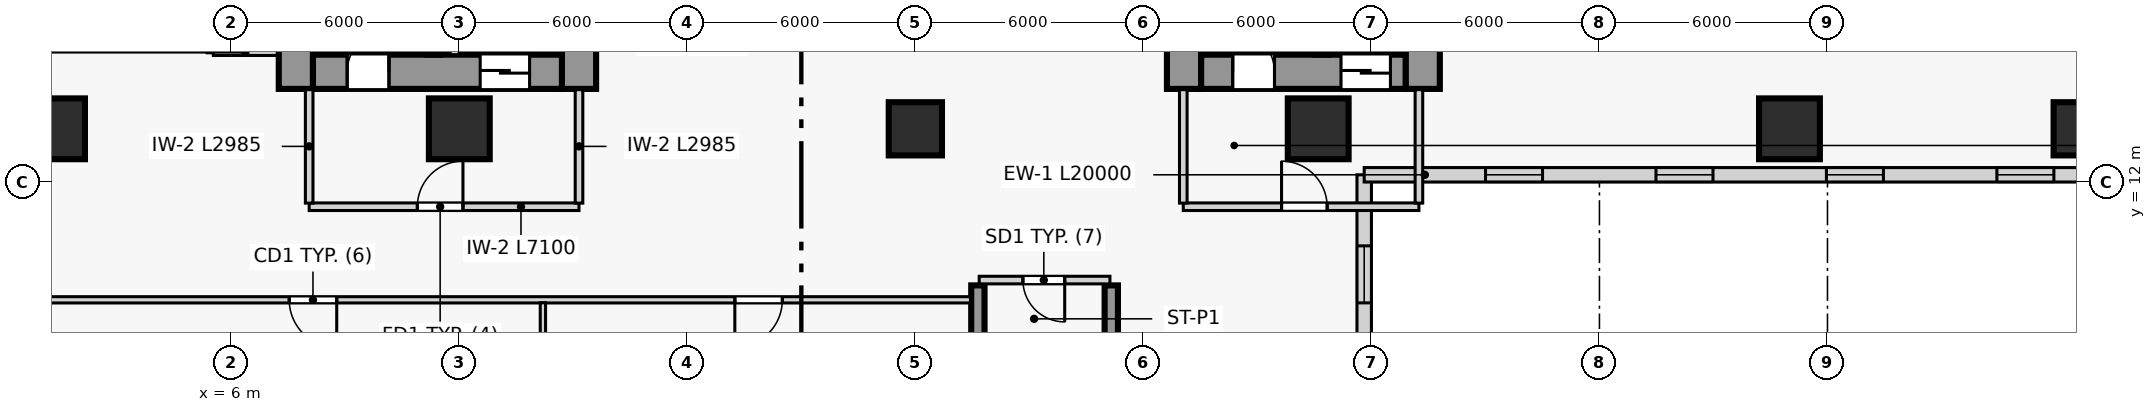
"""IFC4 building model, lengths in metres.
Left out: names, types, materials, properties, quantities, classifications, styles, units other than length and angle.
Written with IfcOpenShell. Run it as: python <this file> out.ifc"""

import sys

from ifc_helpers import new_model, si_unit, direction, frame, frame_2d, origin, origin_2d, place, context, subcontext, project, spatial, rectangle, extrude, source, transform, mapped, element, fill, save


model = new_model("IFC4")
c1 = context("Model", 3, precision=1e-05, world=origin(), true_north=direction((0.0, 1.0)))
c2 = subcontext(c1, "Body", "Model", "MODEL_VIEW")
j1 = project(units=[si_unit("LENGTHUNIT", "METRE"), si_unit("PLANEANGLEUNIT", "RADIAN")], contexts=[c1])
p1 = place(None, origin())
s1 = spatial("IfcSite", under=j1, at=p1, CompositionType="ELEMENT")
p2 = place(p1, origin())
s2 = spatial("IfcBuilding", under=s1, at=p2, CompositionType="ELEMENT")
p3 = place(p2, frame((0.0, 0.0, 9.0)))
s3 = spatial("IfcBuildingStorey", under=s2, at=p3, CompositionType="ELEMENT", Elevation=9.0)
p4 = place(p3, frame((7.7, 14.45, 0.0), z_axis=(0.0, 0.0, 1.0), x_axis=(0.0, 1.0, 0.0)))
e1 = element("IfcWall", 1, at=p4, inside=s3, PredefinedType="SHEAR", context=c2, shape_type="SweptSolid", body=[
    extrude(rectangle(XDim=13.15, YDim=0.9, at=frame_2d((6.575, 0.0))), origin(), (0.0, 0.0, 1.0), 4.5),
])
p5 = place(p3, frame((15.15, 14.45, 0.0), z_axis=(0.0, 0.0, 1.0), x_axis=(0.0, 1.0, 0.0)))
e2 = element("IfcWall", 2, at=p5, inside=s3, PredefinedType="SHEAR", context=c2, shape_type="SweptSolid", body=[
    extrude(rectangle(XDim=13.15, YDim=0.9, at=frame_2d((6.575, 0.0))), origin(), (0.0, 0.0, 1.0), 4.5),
])
p6 = place(p5, frame((5.65, 0.0, 0.0)))
e3 = element("IfcOpeningElement", 3, at=p6, cuts=e2, PredefinedType="OPENING", context=c2, shape_type="SweptSolid", body=[
    extrude(rectangle(XDim=1.1, YDim=2.2, at=frame_2d((0.55, 1.1))), frame((0.0, 0.46, 0.0), z_axis=(0.0, -1.0, 0.0), x_axis=(1.0, 0.0, 0.0)), (0.0, 0.0, 1.0), 0.92),
])
p7 = place(p3, frame((8.15, 14.9, 0.0), z_axis=(0.0, 0.0, 1.0), x_axis=(1.0, 0.0, 0.0)))
e4 = element("IfcWall", 4, at=p7, inside=s3, PredefinedType="SHEAR", context=c2, shape_type="SweptSolid", body=[
    extrude(rectangle(XDim=6.55, YDim=0.9, at=frame_2d((3.275, 0.0))), origin(), (0.0, 0.0, 1.0), 4.5),
])
p8 = place(p7, frame((0.9, 0.0, 0.0)))
e5 = element("IfcOpeningElement", 5, at=p8, cuts=e4, PredefinedType="OPENING", context=c2, shape_type="SweptSolid", body=[
    extrude(rectangle(XDim=1.1, YDim=2.2, at=frame_2d((0.55, 1.1))), frame((0.0, 0.46, 0.0), z_axis=(0.0, -1.0, 0.0), x_axis=(1.0, 0.0, 0.0)), (0.0, 0.0, 1.0), 0.92),
])
p9 = place(p7, frame((4.4, 0.0, 0.0)))
e6 = element("IfcOpeningElement", 6, at=p9, cuts=e4, PredefinedType="OPENING", context=c2, shape_type="SweptSolid", body=[
    extrude(rectangle(XDim=1.3, YDim=2.2, at=frame_2d((0.65, 1.1))), frame((0.0, 0.46, 0.0), z_axis=(0.0, -1.0, 0.0), x_axis=(1.0, 0.0, 0.0)), (0.0, 0.0, 1.0), 0.92),
])
p10 = place(p3, frame((31.07, 14.45, 0.0), z_axis=(0.0, 0.0, 1.0), x_axis=(0.0, 1.0, 0.0)))
e7 = element("IfcWall", 7, at=p10, inside=s3, PredefinedType="SHEAR", context=c2, shape_type="SweptSolid", body=[
    extrude(rectangle(XDim=13.15, YDim=0.9, at=frame_2d((6.575, 0.0))), origin(), (0.0, 0.0, 1.0), 4.5),
])
p11 = place(p3, frame((37.35, 14.45, 0.0), z_axis=(0.0, 0.0, 1.0), x_axis=(0.0, 1.0, 0.0)))
e8 = element("IfcWall", 8, at=p11, inside=s3, PredefinedType="SHEAR", context=c2, shape_type="SweptSolid", body=[
    extrude(rectangle(XDim=13.15, YDim=0.9, at=frame_2d((6.575, 0.0))), origin(), (0.0, 0.0, 1.0), 4.5),
])
p12 = place(p11, frame((5.65, 0.0, 0.0)))
e9 = element("IfcOpeningElement", 9, at=p12, cuts=e8, PredefinedType="OPENING", context=c2, shape_type="SweptSolid", body=[
    extrude(rectangle(XDim=1.1, YDim=2.2, at=frame_2d((0.55, 1.1))), frame((0.0, 0.46, 0.0), z_axis=(0.0, -1.0, 0.0), x_axis=(1.0, 0.0, 0.0)), (0.0, 0.0, 1.0), 0.92),
])
p13 = place(p3, frame((31.52, 14.9, 0.0), z_axis=(0.0, 0.0, 1.0), x_axis=(1.0, 0.0, 0.0)))
e10 = element("IfcWall", 10, at=p13, inside=s3, PredefinedType="SHEAR", context=c2, shape_type="SweptSolid", body=[
    extrude(rectangle(XDim=5.38, YDim=0.9, at=frame_2d((2.69, 0.0))), origin(), (0.0, 0.0, 1.0), 4.5),
])
p14 = place(p13, frame((0.83, 0.0, 0.0)))
e11 = element("IfcOpeningElement", 11, at=p14, cuts=e10, PredefinedType="OPENING", context=c2, shape_type="SweptSolid", body=[
    extrude(rectangle(XDim=1.1, YDim=2.2, at=frame_2d((0.55, 1.1))), frame((0.0, 0.46, 0.0), z_axis=(0.0, -1.0, 0.0), x_axis=(1.0, 0.0, 0.0)), (0.0, 0.0, 1.0), 0.92),
])
p15 = place(p13, frame((3.68, 0.0, 0.0)))
e12 = element("IfcOpeningElement", 12, at=p15, cuts=e10, PredefinedType="OPENING", context=c2, shape_type="SweptSolid", body=[
    extrude(rectangle(XDim=1.3, YDim=2.2, at=frame_2d((0.65, 1.1))), frame((0.0, 0.46, 0.0), z_axis=(0.0, -1.0, 0.0), x_axis=(1.0, 0.0, 0.0)), (0.0, 0.0, 1.0), 0.92),
])
for number, where, z_axis, x_axis in (
    (13, (11.325, 15.35, 0.0), (0.0, 0.0, 1.0), (0.0, 1.0, 0.0)),
    (14, (34.695, 15.35, 0.0), (0.0, 0.0, 1.0), (0.0, 1.0, 0.0)),
):
    element("IfcWall", number, at=place(p3, frame(where, z_axis=z_axis, x_axis=x_axis)), inside=s3, PredefinedType="SHEAR", context=c2, shape_type="SweptSolid", body=[
        extrude(rectangle(XDim=7.75, YDim=0.35, at=frame_2d((3.875, 0.0))), origin(), (0.0, 0.0, 1.0), 4.5),
    ])
for number, where, z_axis, x_axis in (
    (15, (25.645, 1.57, 0.0), (0.0, 0.0, 1.0), (0.0, 1.0, 0.0)),
    (16, (29.155, 1.57, 0.0), (0.0, 0.0, 1.0), (0.0, 1.0, 0.0)),
):
    element("IfcWall", number, at=place(p3, frame(where, z_axis=z_axis, x_axis=x_axis)), inside=s3, PredefinedType="SHEAR", context=c2, shape_type="SweptSolid", body=[
        extrude(rectangle(XDim=7.71, YDim=0.35, at=frame_2d((3.855, 0.0))), origin(), (0.0, 0.0, 1.0), 4.5),
    ])
m1 = source(origin(), c2, "Body", "SweptSolid", [
    extrude(rectangle(XDim=1.6, YDim=1.6, at=origin_2d()), origin(), (0.0, 0.0, 1.0), 4.5),
])
for number, where, z_axis, x_axis in (
    (17, (1.35, 13.4, 0.0), (0.0, 0.0, 1.0), (1.0, 0.0, 0.0)),
    (18, (12.0, 13.4, 0.0), (0.0, 0.0, 1.0), (1.0, 0.0, 0.0)),
):
    element("IfcColumn", number, at=place(p3, frame(where, z_axis=z_axis, x_axis=x_axis)), inside=s3, PredefinedType="COLUMN", context=c2, shape_type="MappedRepresentation", body=[
        mapped(m1, transform((0.0, 0.0, 0.0), scale=1.0)),
    ])
m2 = source(origin(), c2, "Body", "SweptSolid", [
    extrude(rectangle(XDim=1.4, YDim=1.4, at=origin_2d()), origin(), (0.0, 0.0, 1.0), 4.5),
])
p16 = place(p3, frame((24.0, 13.4, 0.0), z_axis=(0.0, 0.0, 1.0), x_axis=(1.0, 0.0, 0.0)))
e19 = element("IfcColumn", 19, at=p16, inside=s3, PredefinedType="COLUMN", context=c2, shape_type="MappedRepresentation", body=[
    mapped(m2, transform((0.0, 0.0, 0.0), scale=1.0)),
])
for number, where, z_axis, x_axis in (
    (20, (34.6, 13.4, 0.0), (0.0, 0.0, 1.0), (1.0, 0.0, 0.0)),
    (21, (47.0, 13.4, 0.0), (0.0, 0.0, 1.0), (1.0, 0.0, 0.0)),
):
    element("IfcColumn", number, at=place(p3, frame(where, z_axis=z_axis, x_axis=x_axis)), inside=s3, PredefinedType="COLUMN", context=c2, shape_type="MappedRepresentation", body=[
        mapped(m1, transform((0.0, 0.0, 0.0), scale=1.0)),
    ])
p17 = place(p3, frame((54.65, 13.4, 0.0), z_axis=(0.0, 0.0, 1.0), x_axis=(1.0, 0.0, 0.0)))
e22 = element("IfcColumn", 22, at=p17, inside=s3, PredefinedType="COLUMN", context=c2, shape_type="MappedRepresentation", body=[
    mapped(m2, transform((0.0, 0.0, 0.0), scale=1.0)),
])
p18 = place(p3, frame((35.81, 7.69, 0.0), z_axis=(0.0, 0.0, 1.0), x_axis=(0.0, 1.0, 0.0)))
e23 = element("IfcWall", 23, at=p18, inside=s3, PredefinedType="SOLIDWALL", context=c2, shape_type="SweptSolid", body=[
    extrude(rectangle(XDim=4.5, YDim=0.38, at=frame_2d((2.25, 0.0))), origin(), (0.0, 0.0, 1.0), 4.16),
])
p19 = place(p18, frame((1.13, 0.0, 0.85)))
e24 = element("IfcOpeningElement", 24, at=p19, cuts=e23, PredefinedType="OPENING", context=c2, shape_type="SweptSolid", body=[
    extrude(rectangle(XDim=1.5, YDim=1.8, at=frame_2d((0.75, 0.9))), frame((0.0, 0.2, 0.0), z_axis=(0.0, -1.0, 0.0), x_axis=(1.0, 0.0, 0.0)), (0.0, 0.0, 1.0), 0.4),
])
p20 = place(p3, frame((35.81, 12.19, 0.0), z_axis=(0.0, 0.0, 1.0), x_axis=(1.0, 0.0, 0.0)))
e25 = element("IfcWall", 25, at=p20, inside=s3, PredefinedType="SOLIDWALL", context=c2, shape_type="SweptSolid", body=[
    extrude(rectangle(XDim=20.0, YDim=0.38, at=frame_2d((10.0, 0.0))), origin(), (0.0, 0.0, 1.0), 4.16),
])
p21 = place(p20, frame((3.192, 0.0, 0.85)))
e26 = element("IfcOpeningElement", 26, at=p21, cuts=e25, PredefinedType="OPENING", context=c2, shape_type="SweptSolid", body=[
    extrude(rectangle(XDim=1.5, YDim=1.8, at=frame_2d((0.75, 0.9))), frame((0.0, 0.2, 0.0), z_axis=(0.0, -1.0, 0.0), x_axis=(1.0, 0.0, 0.0)), (0.0, 0.0, 1.0), 0.4),
])
p22 = place(p20, frame((7.677, 0.0, 0.85)))
e27 = element("IfcOpeningElement", 27, at=p22, cuts=e25, PredefinedType="OPENING", context=c2, shape_type="SweptSolid", body=[
    extrude(rectangle(XDim=1.5, YDim=1.8, at=frame_2d((0.75, 0.9))), frame((0.0, 0.2, 0.0), z_axis=(0.0, -1.0, 0.0), x_axis=(1.0, 0.0, 0.0)), (0.0, 0.0, 1.0), 0.4),
])
p23 = place(p20, frame((12.163, 0.0, 0.85)))
e28 = element("IfcOpeningElement", 28, at=p23, cuts=e25, PredefinedType="OPENING", context=c2, shape_type="SweptSolid", body=[
    extrude(rectangle(XDim=1.5, YDim=1.8, at=frame_2d((0.75, 0.9))), frame((0.0, 0.2, 0.0), z_axis=(0.0, -1.0, 0.0), x_axis=(1.0, 0.0, 0.0)), (0.0, 0.0, 1.0), 0.4),
])
p24 = place(p20, frame((16.647, 0.0, 0.85)))
e29 = element("IfcOpeningElement", 29, at=p24, cuts=e25, PredefinedType="OPENING", context=c2, shape_type="SweptSolid", body=[
    extrude(rectangle(XDim=1.5, YDim=1.8, at=frame_2d((0.75, 0.9))), frame((0.0, 0.2, 0.0), z_axis=(0.0, -1.0, 0.0), x_axis=(1.0, 0.0, 0.0)), (0.0, 0.0, 1.0), 0.4),
])
p25 = place(p3, frame((11.88, 15.35, 0.0), z_axis=(0.0, 0.0, 1.0), x_axis=(0.0, 1.0, 0.0)))
e30 = element("IfcWall", 30, at=p25, inside=s3, PredefinedType="PARTITIONING", context=c2, shape_type="SweptSolid", body=[
    extrude(rectangle(XDim=2.85, YDim=0.24, at=frame_2d((1.425, 0.0))), origin(), (0.0, 0.0, 1.0), 4.16),
])
p26 = place(p3, frame((8.05, 11.35, 0.0), z_axis=(0.0, 0.0, 1.0), x_axis=(1.0, 0.0, 0.0)))
e31 = element("IfcWall", 31, at=p26, inside=s3, PredefinedType="PARTITIONING", context=c2, shape_type="SweptSolid", body=[
    extrude(rectangle(XDim=7.1, YDim=0.2, at=frame_2d((3.55, 0.0))), origin(), (0.0, 0.0, 1.0), 4.16),
])
p27 = place(p26, frame((2.846, 0.0, 0.0)))
e32 = element("IfcOpeningElement", 32, at=p27, cuts=e31, PredefinedType="OPENING", context=c2, shape_type="SweptSolid", body=[
    extrude(rectangle(XDim=1.2, YDim=2.2, at=frame_2d((0.6, 1.1))), frame((0.0, 0.11, 0.0), z_axis=(0.0, -1.0, 0.0), x_axis=(1.0, 0.0, 0.0)), (0.0, 0.0, 1.0), 0.22),
])
for number, where, z_axis, x_axis in (
    (33, (8.05, 11.445, 0.0), (0.0, 0.0, 1.0), (0.0, 1.0, 0.0)),
    (34, (15.15, 11.445, 0.0), (0.0, 0.0, 1.0), (0.0, 1.0, 0.0)),
):
    element("IfcWall", number, at=place(p3, frame(where, z_axis=z_axis, x_axis=x_axis)), inside=s3, PredefinedType="PARTITIONING", context=c2, shape_type="SweptSolid", body=[
        extrude(rectangle(XDim=2.985, YDim=0.2, at=frame_2d((1.492, 0.0))), origin(), (0.0, 0.0, 1.0), 4.16),
    ])
p28 = place(p3, frame((31.05, 11.35, 0.0), z_axis=(0.0, 0.0, 1.0), x_axis=(1.0, 0.0, 0.0)))
e35 = element("IfcWall", 35, at=p28, inside=s3, PredefinedType="PARTITIONING", context=c2, shape_type="SweptSolid", body=[
    extrude(rectangle(XDim=6.2, YDim=0.2, at=frame_2d((3.1, 0.0))), origin(), (0.0, 0.0, 1.0), 4.16),
])
p29 = place(p28, frame((2.586, 0.0, 0.0)))
e36 = element("IfcOpeningElement", 36, at=p29, cuts=e35, PredefinedType="OPENING", context=c2, shape_type="SweptSolid", body=[
    extrude(rectangle(XDim=1.2, YDim=2.2, at=frame_2d((0.6, 1.1))), frame((0.0, 0.11, 0.0), z_axis=(0.0, -1.0, 0.0), x_axis=(1.0, 0.0, 0.0)), (0.0, 0.0, 1.0), 0.22),
])
for number, where, z_axis, x_axis in (
    (37, (31.05, 11.445, 0.0), (0.0, 0.0, 1.0), (0.0, 1.0, 0.0)),
    (38, (37.25, 11.445, 0.0), (0.0, 0.0, 1.0), (0.0, 1.0, 0.0)),
):
    element("IfcWall", number, at=place(p3, frame(where, z_axis=z_axis, x_axis=x_axis)), inside=s3, PredefinedType="PARTITIONING", context=c2, shape_type="SweptSolid", body=[
        extrude(rectangle(XDim=2.985, YDim=0.2, at=frame_2d((1.492, 0.0))), origin(), (0.0, 0.0, 1.0), 4.16),
    ])
p30 = place(p3, frame((5.45, 15.4, 0.0), z_axis=(0.0, 0.0, 1.0), x_axis=(0.0, 1.0, 0.0)))
e39 = element("IfcWall", 39, at=p30, inside=s3, PredefinedType="PARTITIONING", context=c2, shape_type="SweptSolid", body=[
    extrude(rectangle(XDim=10.8, YDim=0.165, at=frame_2d((5.4, 0.0))), origin(), (0.0, 0.0, 1.0), 4.16),
])
p31 = place(p30, frame((1.225, 0.0, 0.0)))
e40 = element("IfcOpeningElement", 40, at=p31, cuts=e39, PredefinedType="OPENING", context=c2, shape_type="SweptSolid", body=[
    extrude(rectangle(XDim=0.95, YDim=2.1, at=frame_2d((0.475, 1.05))), frame((0.0, 0.093, 0.0), z_axis=(0.0, -1.0, 0.0), x_axis=(1.0, 0.0, 0.0)), (0.0, 0.0, 1.0), 0.185),
])
p32 = place(p30, frame((4.85, 0.0, 0.0)))
e41 = element("IfcOpeningElement", 41, at=p32, cuts=e39, PredefinedType="OPENING", context=c2, shape_type="SweptSolid", body=[
    extrude(rectangle(XDim=0.9, YDim=2.1, at=frame_2d((0.45, 1.05))), frame((0.0, 0.093, 0.0), z_axis=(0.0, -1.0, 0.0), x_axis=(1.0, 0.0, 0.0)), (0.0, 0.0, 1.0), 0.185),
])
p33 = place(p30, frame((8.525, 0.0, 0.0)))
e42 = element("IfcOpeningElement", 42, at=p33, cuts=e39, PredefinedType="OPENING", context=c2, shape_type="SweptSolid", body=[
    extrude(rectangle(XDim=0.95, YDim=2.1, at=frame_2d((0.475, 1.05))), frame((0.0, 0.093, 0.0), z_axis=(0.0, -1.0, 0.0), x_axis=(1.0, 0.0, 0.0)), (0.0, 0.0, 1.0), 0.185),
])
p34 = place(p3, frame((5.528, 15.4, 0.0), z_axis=(0.0, 0.0, 1.0), x_axis=(1.0, 0.0, 0.0)))
e43 = element("IfcWall", 43, at=p34, inside=s3, PredefinedType="PARTITIONING", context=c2, shape_type="SweptSolid", body=[
    extrude(rectangle(XDim=1.682, YDim=0.14, at=frame_2d((0.841, 0.0))), origin(), (0.0, 0.0, 1.0), 4.16),
])
p35 = place(p3, frame((25.68, 9.42, 0.0), z_axis=(0.0, 0.0, 1.0), x_axis=(1.0, 0.0, 0.0)))
e44 = element("IfcWall", 44, at=p35, inside=s3, PredefinedType="PARTITIONING", context=c2, shape_type="SweptSolid", body=[
    extrude(rectangle(XDim=3.44, YDim=0.2, at=frame_2d((1.72, 0.0))), origin(), (0.0, 0.0, 1.0), 4.16),
])
p36 = place(p35, frame((1.15, 0.0, 0.0)))
e45 = element("IfcOpeningElement", 45, at=p36, cuts=e44, PredefinedType="OPENING", context=c2, shape_type="SweptSolid", body=[
    extrude(rectangle(XDim=1.1, YDim=2.2, at=frame_2d((0.55, 1.1))), frame((0.0, 0.11, 0.0), z_axis=(0.0, -1.0, 0.0), x_axis=(1.0, 0.0, 0.0)), (0.0, 0.0, 1.0), 0.22),
])
p37 = place(p3, frame((0.185, 8.9, 0.0), z_axis=(0.0, 0.0, 1.0), x_axis=(1.0, 0.0, 0.0)))
e46 = element("IfcWall", 46, at=p37, inside=s3, PredefinedType="PARTITIONING", context=c2, shape_type="SweptSolid", body=[
    extrude(rectangle(XDim=25.265, YDim=0.165, at=frame_2d((12.632, 0.0))), origin(), (0.0, 0.0, 1.0), 4.16),
])
p38 = place(p37, frame((7.34, 0.0, 0.0)))
e47 = element("IfcOpeningElement", 47, at=p38, cuts=e46, PredefinedType="OPENING", context=c2, shape_type="SweptSolid", body=[
    extrude(rectangle(XDim=1.25, YDim=2.2, at=frame_2d((0.625, 1.1))), frame((0.0, 0.093, 0.0), z_axis=(0.0, -1.0, 0.0), x_axis=(1.0, 0.0, 0.0)), (0.0, 0.0, 1.0), 0.185),
])
p39 = place(p37, frame((19.065, 0.0, 0.0)))
e48 = element("IfcOpeningElement", 48, at=p39, cuts=e46, PredefinedType="OPENING", context=c2, shape_type="SweptSolid", body=[
    extrude(rectangle(XDim=1.25, YDim=2.2, at=frame_2d((0.625, 1.1))), frame((0.0, 0.093, 0.0), z_axis=(0.0, -1.0, 0.0), x_axis=(1.0, 0.0, 0.0)), (0.0, 0.0, 1.0), 0.185),
])
p40 = place(p3, frame((14.2, -5.815, 0.0), z_axis=(0.0, 0.0, 1.0), x_axis=(0.0, 1.0, 0.0)))
e49 = element("IfcWall", 49, at=p40, inside=s3, PredefinedType="PARTITIONING", context=c2, shape_type="SweptSolid", body=[
    extrude(rectangle(XDim=14.637, YDim=0.14, at=frame_2d((7.319, 0.0))), origin(), (0.0, 0.0, 1.0), 4.16),
])
m3 = source(origin(), c2, "Body", "SweptSolid", [
    extrude(rectangle(XDim=1.5, YDim=1.8, at=frame_2d((0.75, 0.9))), frame((0.0, 0.03, 0.0), z_axis=(0.0, -1.0, 0.0), x_axis=(1.0, 0.0, 0.0)), (0.0, 0.0, 1.0), 0.06),
])
p41 = place(p19, origin())
e50 = element("IfcWindow", 50, at=p41, inside=s3, PartitioningType="SINGLE_PANEL", PredefinedType="WINDOW", context=c2, shape_type="MappedRepresentation", body=[
    mapped(m3, transform((0.0, 0.0, 0.0), scale=1.0)),
])
fill(e24, e50)
p42 = place(p21, origin())
e51 = element("IfcWindow", 51, at=p42, inside=s3, PartitioningType="SINGLE_PANEL", PredefinedType="WINDOW", context=c2, shape_type="MappedRepresentation", body=[
    mapped(m3, transform((0.0, 0.0, 0.0), scale=1.0)),
])
fill(e26, e51)
p43 = place(p22, origin())
e52 = element("IfcWindow", 52, at=p43, inside=s3, PartitioningType="SINGLE_PANEL", PredefinedType="WINDOW", context=c2, shape_type="MappedRepresentation", body=[
    mapped(m3, transform((0.0, 0.0, 0.0), scale=1.0)),
])
fill(e27, e52)
p44 = place(p23, origin())
e53 = element("IfcWindow", 53, at=p44, inside=s3, PartitioningType="SINGLE_PANEL", PredefinedType="WINDOW", context=c2, shape_type="MappedRepresentation", body=[
    mapped(m3, transform((0.0, 0.0, 0.0), scale=1.0)),
])
fill(e28, e53)
p45 = place(p24, origin())
e54 = element("IfcWindow", 54, at=p45, inside=s3, PartitioningType="SINGLE_PANEL", PredefinedType="WINDOW", context=c2, shape_type="MappedRepresentation", body=[
    mapped(m3, transform((0.0, 0.0, 0.0), scale=1.0)),
])
fill(e29, e54)
m4 = source(origin(), c2, "Body", "SweptSolid", [
    extrude(rectangle(XDim=1.1, YDim=2.2, at=frame_2d((0.55, 1.1))), frame((0.0, 0.025, 0.0), z_axis=(0.0, -1.0, 0.0), x_axis=(1.0, 0.0, 0.0)), (0.0, 0.0, 1.0), 0.05),
])
p46 = place(p8, origin())
e55 = element("IfcDoor", 55, at=p46, inside=s3, OperationType="SINGLE_SWING_RIGHT", PredefinedType="DOOR", context=c2, shape_type="MappedRepresentation", body=[
    mapped(m4, transform((0.0, 0.0, 0.0), scale=1.0)),
])
fill(e5, e55)
p47 = place(p14, origin())
e56 = element("IfcDoor", 56, at=p47, inside=s3, OperationType="SINGLE_SWING_LEFT", PredefinedType="DOOR", context=c2, shape_type="MappedRepresentation", body=[
    mapped(m4, transform((0.0, 0.0, 0.0), scale=1.0)),
])
fill(e11, e56)
m5 = source(origin(), c2, "Body", "SweptSolid", [
    extrude(rectangle(XDim=1.3, YDim=2.2, at=frame_2d((0.65, 1.1))), frame((0.0, 0.025, 0.0), z_axis=(0.0, -1.0, 0.0), x_axis=(1.0, 0.0, 0.0)), (0.0, 0.0, 1.0), 0.05),
])
p48 = place(p9, origin())
e57 = element("IfcDoor", 57, at=p48, inside=s3, OperationType="SLIDING_TO_RIGHT", PredefinedType="DOOR", context=c2, shape_type="MappedRepresentation", body=[
    mapped(m5, transform((0.0, 0.0, 0.0), scale=1.0)),
])
fill(e6, e57)
p49 = place(p15, origin())
e58 = element("IfcDoor", 58, at=p49, inside=s3, OperationType="SLIDING_TO_RIGHT", PredefinedType="DOOR", context=c2, shape_type="MappedRepresentation", body=[
    mapped(m5, transform((0.0, 0.0, 0.0), scale=1.0)),
])
fill(e12, e58)
m6 = source(origin(), c2, "Body", "SweptSolid", [
    extrude(rectangle(XDim=1.2, YDim=2.2, at=frame_2d((0.6, 1.1))), frame((0.0, 0.025, 0.0), z_axis=(0.0, -1.0, 0.0), x_axis=(1.0, 0.0, 0.0)), (0.0, 0.0, 1.0), 0.05),
])
p50 = place(p27, origin())
e59 = element("IfcDoor", 59, at=p50, inside=s3, OperationType="SINGLE_SWING_RIGHT", PredefinedType="DOOR", context=c2, shape_type="MappedRepresentation", body=[
    mapped(m6, transform((0.0, 0.0, 0.0), scale=1.0)),
])
fill(e32, e59)
p51 = place(p29, origin())
e60 = element("IfcDoor", 60, at=p51, inside=s3, OperationType="SINGLE_SWING_LEFT", PredefinedType="DOOR", context=c2, shape_type="MappedRepresentation", body=[
    mapped(m6, transform((0.0, 0.0, 0.0), scale=1.0)),
])
fill(e36, e60)
p52 = place(p36, frame((1.1, 0.0, 0.0), z_axis=(0.0, 0.0, 1.0), x_axis=(-1.0, 0.0, 0.0)))
e61 = element("IfcDoor", 61, at=p52, inside=s3, OperationType="SINGLE_SWING_LEFT", PredefinedType="DOOR", context=c2, shape_type="MappedRepresentation", body=[
    mapped(m4, transform((0.0, 0.0, 0.0), scale=1.0)),
])
fill(e45, e61)
m7 = source(origin(), c2, "Body", "SweptSolid", [
    extrude(rectangle(XDim=1.25, YDim=2.2, at=frame_2d((0.625, 1.1))), frame((0.0, 0.025, 0.0), z_axis=(0.0, -1.0, 0.0), x_axis=(1.0, 0.0, 0.0)), (0.0, 0.0, 1.0), 0.05),
])
p53 = place(p38, frame((1.25, 0.0, 0.0), z_axis=(0.0, 0.0, 1.0), x_axis=(-1.0, 0.0, 0.0)))
e62 = element("IfcDoor", 62, at=p53, inside=s3, OperationType="SINGLE_SWING_LEFT", PredefinedType="DOOR", context=c2, shape_type="MappedRepresentation", body=[
    mapped(m7, transform((0.0, 0.0, 0.0), scale=1.0)),
])
fill(e47, e62)
p54 = place(p39, frame((1.25, 0.0, 0.0), z_axis=(0.0, 0.0, 1.0), x_axis=(-1.0, 0.0, 0.0)))
e63 = element("IfcDoor", 63, at=p54, inside=s3, OperationType="SINGLE_SWING_RIGHT", PredefinedType="DOOR", context=c2, shape_type="MappedRepresentation", body=[
    mapped(m7, transform((0.0, 0.0, 0.0), scale=1.0)),
])
fill(e48, e63)
save(model, sys.argv[1])
